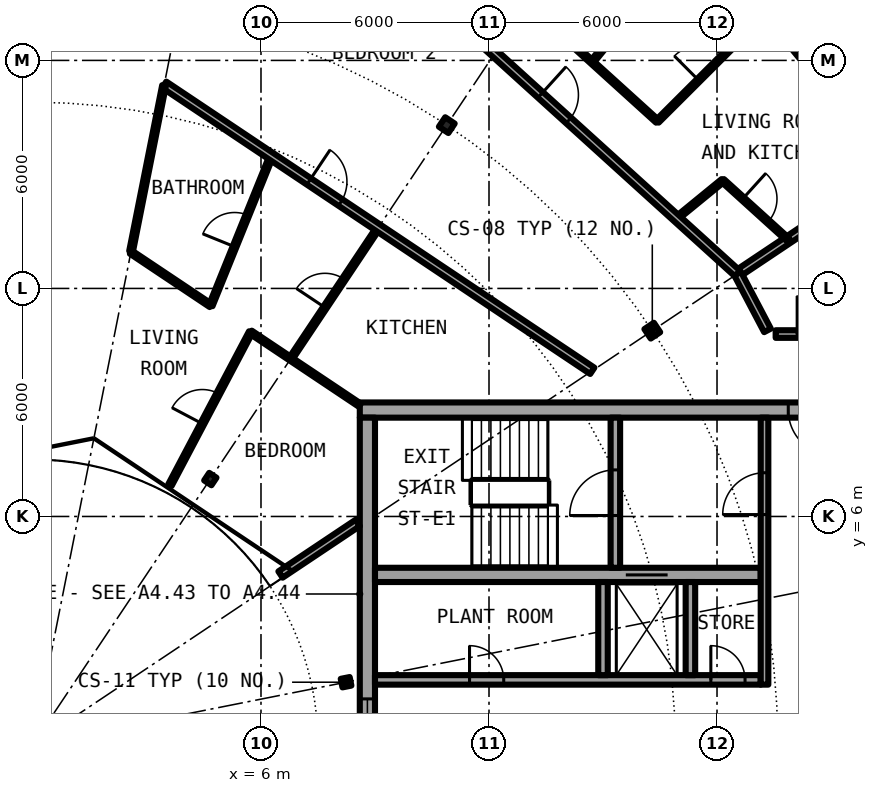
"""IFC4 building model, lengths in metres.
Left out: names, types, materials, properties, quantities, classifications, styles, units other than length and angle.
Written with IfcOpenShell. Run it as: python <this file> out.ifc"""

import sys

from ifc_helpers import new_model, si_unit, direction, frame, frame_2d, origin, origin_2d, place, context, subcontext, project, spatial, rectangle, i_section, extrude, element, fill, save


model = new_model("IFC4")
c1 = context("Model", 3, precision=1e-05, world=origin(), true_north=direction((0.0, 1.0)))
c2 = subcontext(c1, "Body", "Model", "MODEL_VIEW")
j1 = project(units=[si_unit("LENGTHUNIT", "METRE"), si_unit("PLANEANGLEUNIT", "RADIAN")], contexts=[c1])
p1 = place(None, origin())
s1 = spatial("IfcSite", under=j1, at=p1, CompositionType="ELEMENT")
p2 = place(p1, origin())
s2 = spatial("IfcBuilding", under=s1, at=p2, CompositionType="ELEMENT")
p3 = place(p2, frame((0.0, 0.0, 227.95)))
s3 = spatial("IfcBuildingStorey", under=s2, at=p3, CompositionType="ELEMENT", Elevation=227.95)
for number, where, z_axis, x_axis in (
    (1, (16.297, 10.889, 0.0), (0.0, 0.0, 1.0), (0.831, 0.556, 0.0)),
    (2, (10.889, 16.297, 0.0), (0.0, 0.0, 1.0), (0.556, 0.831, 0.0)),
):
    element("IfcColumn", number, at=place(p3, frame(where, z_axis=z_axis, x_axis=x_axis)), inside=s3, PredefinedType="COLUMN", context=c2, shape_type="SweptSolid", body=[
        extrude(i_section(OverallWidth=0.3, OverallDepth=0.3, WebThickness=0.011, FlangeThickness=0.019, FilletRadius=0.027, at=origin_2d()), origin(), (0.0, 0.0, 1.0), 3.05),
    ])
for number, where, z_axis, x_axis in (
    (3, (8.239, 1.639, 0.0), (0.0, 0.0, 1.0), (0.981, 0.195, 0.0)),
    (4, (4.667, 6.984, 0.0), (0.0, 0.0, 1.0), (0.556, 0.831, 0.0)),
):
    element("IfcColumn", number, at=place(p3, frame(where, z_axis=z_axis, x_axis=x_axis)), inside=s3, PredefinedType="COLUMN", context=c2, shape_type="SweptSolid", body=[
        extrude(i_section(OverallWidth=0.24, OverallDepth=0.23, WebThickness=0.008, FlangeThickness=0.012, FilletRadius=0.021, at=origin_2d()), origin(), (0.0, 0.0, 1.0), 3.05),
    ])
p4 = place(p3, frame((22.699, 15.167, 0.0), z_axis=(0.0, 0.0, 1.0), x_axis=(-0.634382322723, 0.773019449054, 0.0)))
e5 = element("IfcWall", 5, at=p4, inside=s3, PredefinedType="SOLIDWALL", context=c2, shape_type="SweptSolid", body=[
    extrude(rectangle(XDim=5.352, YDim=0.25, at=frame_2d((2.676, 0.0))), origin(), (0.0, 0.0, 1.0), 2.7),
])
p5 = place(p4, frame((0.841, 0.0, 0.0)))
e6 = element("IfcOpeningElement", 6, at=p5, cuts=e5, PredefinedType="OPENING", context=c2, shape_type="SweptSolid", body=[
    extrude(rectangle(XDim=1.0, YDim=2.2, at=frame_2d((0.5, 1.1))), frame((0.0, 0.135, 0.0), z_axis=(0.0, -1.0, 0.0), x_axis=(1.0, 0.0, 0.0)), (0.0, 0.0, 1.0), 0.27),
])
p6 = place(p4, frame((3.111, 0.0, 0.3)))
e7 = element("IfcOpeningElement", 7, at=p6, cuts=e5, PredefinedType="OPENING", context=c2, shape_type="SweptSolid", body=[
    extrude(rectangle(XDim=1.8, YDim=2.1, at=frame_2d((0.9, 1.05))), frame((0.0, 0.135, 0.0), z_axis=(0.0, -1.0, 0.0), x_axis=(1.0, 0.0, 0.0)), (0.0, 0.0, 1.0), 0.27),
])
p7 = place(p3, frame((22.0, 8.8, 0.0), z_axis=(0.0, 0.0, 1.0), x_axis=(-1.0, 0.0, 0.0)))
e8 = element("IfcWall", 8, at=p7, inside=s3, PredefinedType="SHEAR", context=c2, shape_type="SweptSolid", body=[
    extrude(rectangle(XDim=13.4, YDim=0.4, at=frame_2d((6.7, 0.0))), origin(), (0.0, 0.0, 1.0), 3.05),
])
p8 = place(p7, frame((0.925, 0.0, 0.0)))
e9 = element("IfcOpeningElement", 9, at=p8, cuts=e8, PredefinedType="OPENING", context=c2, shape_type="SweptSolid", body=[
    extrude(rectangle(XDim=1.2, YDim=2.3, at=frame_2d((0.6, 1.15))), frame((0.0, 0.21, 0.0), z_axis=(0.0, -1.0, 0.0), x_axis=(1.0, 0.0, 0.0)), (0.0, 0.0, 1.0), 0.42),
])
p9 = place(p3, frame((8.8, -8.6, 0.0), z_axis=(0.0, 0.0, 1.0), x_axis=(0.0, 1.0, 0.0)))
e10 = element("IfcWall", 10, at=p9, inside=s3, PredefinedType="SHEAR", context=c2, shape_type="SweptSolid", body=[
    extrude(rectangle(XDim=17.2, YDim=0.4, at=frame_2d((8.6, 0.0))), origin(), (0.0, 0.0, 1.0), 3.05),
])
p10 = place(p9, frame((7.4, 0.0, 0.1)))
e11 = element("IfcOpeningElement", 11, at=p10, cuts=e10, PredefinedType="OPENING", context=c2, shape_type="SweptSolid", body=[
    extrude(rectangle(XDim=2.4, YDim=2.2, at=frame_2d((1.2, 1.1))), frame((0.0, 0.21, 0.0), z_axis=(0.0, -1.0, 0.0), x_axis=(1.0, 0.0, 0.0)), (0.0, 0.0, 1.0), 0.42),
])
p11 = place(p3, frame((9.0, 1.7, 0.0), z_axis=(0.0, 0.0, 1.0), x_axis=(1.0, 0.0, 0.0)))
e12 = element("IfcWall", 12, at=p11, inside=s3, PredefinedType="SHEAR", context=c2, shape_type="SweptSolid", body=[
    extrude(rectangle(XDim=10.15, YDim=0.25, at=frame_2d((5.075, 0.0))), origin(), (0.0, 0.0, 1.0), 3.05),
])
p12 = place(p11, frame((2.488, 0.0, 0.0)))
e13 = element("IfcOpeningElement", 13, at=p12, cuts=e12, PredefinedType="OPENING", context=c2, shape_type="SweptSolid", body=[
    extrude(rectangle(XDim=0.9, YDim=2.3, at=frame_2d((0.45, 1.15))), frame((0.0, 0.135, 0.0), z_axis=(0.0, -1.0, 0.0), x_axis=(1.0, 0.0, 0.0)), (0.0, 0.0, 1.0), 0.27),
])
p13 = place(p11, frame((8.837, 0.0, 0.0)))
e14 = element("IfcOpeningElement", 14, at=p13, cuts=e12, PredefinedType="OPENING", context=c2, shape_type="SweptSolid", body=[
    extrude(rectangle(XDim=0.9, YDim=2.3, at=frame_2d((0.45, 1.15))), frame((0.0, 0.135, 0.0), z_axis=(0.0, -1.0, 0.0), x_axis=(1.0, 0.0, 0.0)), (0.0, 0.0, 1.0), 0.27),
])
p14 = place(p3, frame((9.0, 4.462, 0.0), z_axis=(0.0, 0.0, 1.0), x_axis=(1.0, 0.0, 0.0)))
e15 = element("IfcWall", 15, at=p14, inside=s3, PredefinedType="SHEAR", context=c2, shape_type="SweptSolid", body=[
    extrude(rectangle(XDim=10.15, YDim=0.375, at=frame_2d((5.075, 0.0))), origin(), (0.0, 0.0, 1.0), 3.05),
])
p15 = place(p14, frame((6.6, 0.0, 0.0)))
e16 = element("IfcOpeningElement", 16, at=p15, cuts=e15, PredefinedType="OPENING", context=c2, shape_type="SweptSolid", body=[
    extrude(rectangle(XDim=1.1, YDim=2.3, at=frame_2d((0.55, 1.15))), frame((0.0, 0.198, 0.0), z_axis=(0.0, -1.0, 0.0), x_axis=(1.0, 0.0, 0.0)), (0.0, 0.0, 1.0), 0.395),
])
p16 = place(p3, frame((15.325, 4.65, 0.0), z_axis=(0.0, 0.0, 1.0), x_axis=(0.0, 1.0, 0.0)))
e17 = element("IfcWall", 17, at=p16, inside=s3, PredefinedType="SHEAR", context=c2, shape_type="SweptSolid", body=[
    extrude(rectangle(XDim=3.95, YDim=0.25, at=frame_2d((1.975, 0.0))), origin(), (0.0, 0.0, 1.0), 3.05),
])
p17 = place(p16, frame((1.375, 0.0, 0.0)))
e18 = element("IfcOpeningElement", 18, at=p17, cuts=e17, PredefinedType="OPENING", context=c2, shape_type="SweptSolid", body=[
    extrude(rectangle(XDim=1.2, YDim=2.3, at=frame_2d((0.6, 1.15))), frame((0.0, 0.135, 0.0), z_axis=(0.0, -1.0, 0.0), x_axis=(1.0, 0.0, 0.0)), (0.0, 0.0, 1.0), 0.27),
])
for number, where, z_axis, x_axis in (
    (19, (15.0, 1.825, 0.0), (0.0, 0.0, 1.0), (0.0, 1.0, 0.0)),
    (20, (17.3, 1.825, 0.0), (0.0, 0.0, 1.0), (0.0, 1.0, 0.0)),
):
    element("IfcWall", number, at=place(p3, frame(where, z_axis=z_axis, x_axis=x_axis)), inside=s3, PredefinedType="SOLIDWALL", context=c2, shape_type="SweptSolid", body=[
        extrude(rectangle(XDim=2.45, YDim=0.25, at=frame_2d((1.225, 0.0))), origin(), (0.0, 0.0, 1.0), 2.7),
    ])
p18 = place(p3, frame((19.25, 1.575, 0.0), z_axis=(0.0, 0.0, 1.0), x_axis=(0.0, 1.0, 0.0)))
e21 = element("IfcWall", 21, at=p18, inside=s3, PredefinedType="SOLIDWALL", context=c2, shape_type="SweptSolid", body=[
    extrude(rectangle(XDim=7.025, YDim=0.2, at=frame_2d((3.513, 0.0))), origin(), (0.0, 0.0, 1.0), 2.7),
])
p19 = place(p18, frame((4.475, 0.0, 0.0)))
e22 = element("IfcOpeningElement", 22, at=p19, cuts=e21, PredefinedType="OPENING", context=c2, shape_type="SweptSolid", body=[
    extrude(rectangle(XDim=1.1, YDim=2.3, at=frame_2d((0.55, 1.15))), frame((0.0, 0.11, 0.0), z_axis=(0.0, -1.0, 0.0), x_axis=(1.0, 0.0, 0.0)), (0.0, 0.0, 1.0), 0.22),
])
p20 = place(p3, frame((3.605, 6.827, 0.0), z_axis=(0.0, 0.0, 1.0), x_axis=(0.466962677975, 0.884277025246, 0.0)))
e23 = element("IfcWall", 23, at=p20, inside=s3, PredefinedType="PARTITIONING", context=c2, shape_type="SweptSolid", body=[
    extrude(rectangle(XDim=4.549, YDim=0.1, at=frame_2d((2.274, 0.0))), origin(), (0.0, 0.0, 1.0), 2.7),
])
p21 = place(p20, frame((1.824, 0.0, 0.0)))
e24 = element("IfcOpeningElement", 24, at=p21, cuts=e23, PredefinedType="OPENING", context=c2, shape_type="SweptSolid", body=[
    extrude(rectangle(XDim=0.9, YDim=2.3, at=frame_2d((0.45, 1.15))), frame((0.0, 0.06, 0.0), z_axis=(0.0, -1.0, 0.0), x_axis=(1.0, 0.0, 0.0)), (0.0, 0.0, 1.0), 0.12),
])
p22 = place(p3, frame((4.678, 11.551, 0.0), z_axis=(0.0, 0.0, 1.0), x_axis=(0.375509828455, 0.926818411952, 0.0)))
e25 = element("IfcWall", 25, at=p22, inside=s3, PredefinedType="PARTITIONING", context=c2, shape_type="SweptSolid", body=[
    extrude(rectangle(XDim=4.237, YDim=0.1, at=frame_2d((2.119, 0.0))), origin(), (0.0, 0.0, 1.0), 2.7),
])
p23 = place(p22, frame((1.669, 0.0, 0.0)))
e26 = element("IfcOpeningElement", 26, at=p23, cuts=e25, PredefinedType="OPENING", context=c2, shape_type="SweptSolid", body=[
    extrude(rectangle(XDim=0.9, YDim=2.3, at=frame_2d((0.45, 1.15))), frame((0.0, 0.06, 0.0), z_axis=(0.0, -1.0, 0.0), x_axis=(1.0, 0.0, 0.0)), (0.0, 0.0, 1.0), 0.12),
])
p24 = place(p3, frame((6.78, 10.147, 0.0), z_axis=(0.0, 0.0, 1.0), x_axis=(0.555528237031, 0.831497671591, 0.0)))
e27 = element("IfcWall", 27, at=p24, inside=s3, PredefinedType="PARTITIONING", context=c2, shape_type="SweptSolid", body=[
    extrude(rectangle(XDim=4.149, YDim=0.1, at=frame_2d((2.075, 0.0))), origin(), (0.0, 0.0, 1.0), 2.7),
])
p25 = place(p24, frame((1.625, 0.0, 0.0)))
e28 = element("IfcOpeningElement", 28, at=p25, cuts=e27, PredefinedType="OPENING", context=c2, shape_type="SweptSolid", body=[
    extrude(rectangle(XDim=0.9, YDim=2.3, at=frame_2d((0.45, 1.15))), frame((0.0, 0.06, 0.0), z_axis=(0.0, -1.0, 0.0), x_axis=(1.0, 0.0, 0.0)), (0.0, 0.0, 1.0), 0.12),
])
p26 = place(p3, frame((14.709, 17.958, 0.0), z_axis=(0.0, 0.0, 1.0), x_axis=(0.633590098448, 0.773668913133, 0.0)))
e29 = element("IfcWall", 29, at=p26, inside=s3, PredefinedType="PARTITIONING", context=c2, shape_type="SweptSolid", body=[
    extrude(rectangle(XDim=3.962, YDim=0.1, at=frame_2d((1.981, 0.0))), origin(), (0.0, 0.0, 1.0), 2.7),
])
p27 = place(p3, frame((16.43, 16.398, 0.0), z_axis=(0.0, 0.0, 1.0), x_axis=(0.707722727509, 0.706490297858, 0.0)))
e30 = element("IfcWall", 30, at=p27, inside=s3, PredefinedType="PARTITIONING", context=c2, shape_type="SweptSolid", body=[
    extrude(rectangle(XDim=3.962, YDim=0.1, at=frame_2d((1.981, 0.0))), origin(), (0.0, 0.0, 1.0), 2.7),
])
p28 = place(p27, frame((1.531, 0.0, 0.0)))
e31 = element("IfcOpeningElement", 31, at=p28, cuts=e30, PredefinedType="OPENING", context=c2, shape_type="SweptSolid", body=[
    extrude(rectangle(XDim=0.9, YDim=2.3, at=frame_2d((0.45, 1.15))), frame((0.0, 0.06, 0.0), z_axis=(0.0, -1.0, 0.0), x_axis=(1.0, 0.0, 0.0)), (0.0, 0.0, 1.0), 0.12),
])
p29 = place(p3, frame((16.936, 13.845, 0.0), z_axis=(0.0, 0.0, 1.0), x_axis=(0.774283039722, 0.632839453889, 0.0)))
e32 = element("IfcWall", 32, at=p29, inside=s3, PredefinedType="PARTITIONING", context=c2, shape_type="SweptSolid", body=[
    extrude(rectangle(XDim=1.569, YDim=0.1, at=frame_2d((0.785, 0.0))), origin(), (0.0, 0.0, 1.0), 2.7),
])
p30 = place(p3, frame((18.542, 12.389, 0.0), z_axis=(0.0, 0.0, 1.0), x_axis=(0.831387096605, 0.55569370664, 0.0)))
e33 = element("IfcWall", 33, at=p30, inside=s3, PredefinedType="PARTITIONING", context=c2, shape_type="SweptSolid", body=[
    extrude(rectangle(XDim=4.875, YDim=0.2, at=frame_2d((2.438, 0.0))), origin(), (0.0, 0.0, 1.0), 2.7),
])
p31 = place(p3, frame((6.513, 4.472, 0.0), z_axis=(0.0, 0.0, 1.0), x_axis=(0.831450132577, 0.555599385382, 0.0)))
e34 = element("IfcWall", 34, at=p31, inside=s3, PredefinedType="PARTITIONING", context=c2, shape_type="SweptSolid", body=[
    extrude(rectangle(XDim=2.443, YDim=0.2, at=frame_2d((1.221, 0.0))), origin(), (0.0, 0.0, 1.0), 2.7),
])
p32 = place(p3, frame((19.543, 10.8, 0.0), z_axis=(0.0, 0.0, 1.0), x_axis=(1.0, 0.0, 0.0)))
e35 = element("IfcWall", 35, at=p32, inside=s3, PredefinedType="PARTITIONING", context=c2, shape_type="SweptSolid", body=[
    extrude(rectangle(XDim=2.132, YDim=0.2, at=frame_2d((1.066, 0.0))), origin(), (0.0, 0.0, 1.0), 2.7),
])
p33 = place(p32, frame((0.566, 0.0, 0.0)))
e36 = element("IfcOpeningElement", 36, at=p33, cuts=e35, PredefinedType="OPENING", context=c2, shape_type="SweptSolid", body=[
    extrude(rectangle(XDim=1.0, YDim=2.3, at=frame_2d((0.5, 1.15))), frame((0.0, 0.11, 0.0), z_axis=(0.0, -1.0, 0.0), x_axis=(1.0, 0.0, 0.0)), (0.0, 0.0, 1.0), 0.22),
])
p34 = place(p3, frame((2.577, 12.955, 0.0), z_axis=(0.0, 0.0, 1.0), x_axis=(0.831440395268, -0.555613956912, 0.0)))
e37 = element("IfcWall", 37, at=p34, inside=s3, PredefinedType="PARTITIONING", context=c2, shape_type="SweptSolid", body=[
    extrude(rectangle(XDim=2.527, YDim=0.1, at=frame_2d((1.264, 0.0))), origin(), (0.0, 0.0, 1.0), 2.7),
])
p35 = place(p3, frame((5.73, 10.848, 0.0), z_axis=(0.0, 0.0, 1.0), x_axis=(0.831397130511, -0.555678694372, 0.0)))
e38 = element("IfcWall", 38, at=p35, inside=s3, PredefinedType="PARTITIONING", context=c2, shape_type="SweptSolid", body=[
    extrude(rectangle(XDim=3.453, YDim=0.1, at=frame_2d((1.727, 0.0))), origin(), (0.0, 0.0, 1.0), 2.7),
])
p36 = place(p3, frame((3.453, 17.36, 0.0), z_axis=(0.0, 0.0, 1.0), x_axis=(0.831437137577, -0.555618831806, 0.0)))
e39 = element("IfcWall", 39, at=p36, inside=s3, PredefinedType="PARTITIONING", context=c2, shape_type="SweptSolid", body=[
    extrude(rectangle(XDim=13.549, YDim=0.2, at=frame_2d((6.774, 0.0))), origin(), (0.0, 0.0, 1.0), 2.7),
])
p37 = place(p36, frame((4.581, 0.0, 0.0)))
e40 = element("IfcOpeningElement", 40, at=p37, cuts=e39, PredefinedType="OPENING", context=c2, shape_type="SweptSolid", body=[
    extrude(rectangle(XDim=1.0, YDim=2.3, at=frame_2d((0.5, 1.15))), frame((0.0, 0.11, 0.0), z_axis=(0.0, -1.0, 0.0), x_axis=(1.0, 0.0, 0.0)), (0.0, 0.0, 1.0), 0.22),
])
p38 = place(p3, frame((10.512, 19.667, 0.0), z_axis=(0.0, 0.0, 1.0), x_axis=(0.740947367223, -0.671563101283, 0.0)))
e41 = element("IfcWall", 41, at=p38, inside=s3, PredefinedType="PARTITIONING", context=c2, shape_type="SweptSolid", body=[
    extrude(rectangle(XDim=10.837, YDim=0.2, at=frame_2d((5.419, 0.0))), origin(), (0.0, 0.0, 1.0), 2.7),
])
p39 = place(p38, frame((3.835, 0.0, 0.0)))
e42 = element("IfcOpeningElement", 42, at=p39, cuts=e41, PredefinedType="OPENING", context=c2, shape_type="SweptSolid", body=[
    extrude(rectangle(XDim=1.0, YDim=2.3, at=frame_2d((0.5, 1.15))), frame((0.0, 0.11, 0.0), z_axis=(0.0, -1.0, 0.0), x_axis=(1.0, 0.0, 0.0)), (0.0, 0.0, 1.0), 0.22),
])
p40 = place(p3, frame((18.542, 12.389, 0.0), z_axis=(0.0, 0.0, 1.0), x_axis=(0.465812036273, -0.88488369115, 0.0)))
e43 = element("IfcWall", 43, at=p40, inside=s3, PredefinedType="PARTITIONING", context=c2, shape_type="SweptSolid", body=[
    extrude(rectangle(XDim=1.687, YDim=0.2, at=frame_2d((0.844, 0.0))), origin(), (0.0, 0.0, 1.0), 2.7),
])
p41 = place(p3, frame((11.266, 21.078, 0.0), z_axis=(0.0, 0.0, 1.0), x_axis=(0.74097115376, -0.671536856245, 0.0)))
e44 = element("IfcWall", 44, at=p41, inside=s3, PredefinedType="PARTITIONING", context=c2, shape_type="SweptSolid", body=[
    extrude(rectangle(XDim=6.969, YDim=0.1, at=frame_2d((3.484, 0.0))), origin(), (0.0, 0.0, 1.0), 2.7),
])
p42 = place(p41, frame((3.034, 0.0, 0.0)))
e45 = element("IfcOpeningElement", 45, at=p42, cuts=e44, PredefinedType="OPENING", context=c2, shape_type="SweptSolid", body=[
    extrude(rectangle(XDim=0.9, YDim=2.3, at=frame_2d((0.45, 1.15))), frame((0.0, 0.06, 0.0), z_axis=(0.0, -1.0, 0.0), x_axis=(1.0, 0.0, 0.0)), (0.0, 0.0, 1.0), 0.12),
])
p43 = place(p41, frame((0.712, 0.0, 0.0)))
e46 = element("IfcOpeningElement", 46, at=p43, cuts=e44, PredefinedType="OPENING", context=c2, shape_type="SweptSolid", body=[
    extrude(rectangle(XDim=0.9, YDim=2.3, at=frame_2d((0.45, 1.15))), frame((0.0, 0.06, 0.0), z_axis=(0.0, -1.0, 0.0), x_axis=(1.0, 0.0, 0.0)), (0.0, 0.0, 1.0), 0.12),
])
p44 = place(p3, frame((18.149, 14.84, 0.0), z_axis=(0.0, 0.0, 1.0), x_axis=(0.741127434804, -0.671364376014, 0.0)))
e47 = element("IfcWall", 47, at=p44, inside=s3, PredefinedType="PARTITIONING", context=c2, shape_type="SweptSolid", body=[
    extrude(rectangle(XDim=2.324, YDim=0.1, at=frame_2d((1.162, 0.0))), origin(), (0.0, 0.0, 1.0), 2.7),
])
p45 = place(p44, frame((0.714, 0.0, 0.0)))
e48 = element("IfcOpeningElement", 48, at=p45, cuts=e47, PredefinedType="OPENING", context=c2, shape_type="SweptSolid", body=[
    extrude(rectangle(XDim=0.9, YDim=2.3, at=frame_2d((0.45, 1.15))), frame((0.0, 0.06, 0.0), z_axis=(0.0, -1.0, 0.0), x_axis=(1.0, 0.0, 0.0)), (0.0, 0.0, 1.0), 0.12),
])
p46 = place(p3, frame((2.581, 12.976, 0.0), z_axis=(0.0, 0.0, 1.0), x_axis=(0.195102838171, 0.980782790702, 0.0)))
e49 = element("IfcWall", 49, at=p46, inside=s3, PredefinedType="PARTITIONING", context=c2, shape_type="SweptSolid", body=[
    extrude(rectangle(XDim=4.448, YDim=0.1, at=frame_2d((2.224, 0.0))), origin(), (0.0, 0.0, 1.0), 2.7),
])
p47 = place(p6, origin())
e50 = element("IfcWindow", 50, at=p47, inside=s3, PartitioningType="SINGLE_PANEL", PredefinedType="WINDOW", context=c2, shape_type="SweptSolid", body=[
    extrude(rectangle(XDim=1.8, YDim=2.1, at=frame_2d((0.9, 1.05))), frame((0.0, 0.03, 0.0), z_axis=(0.0, -1.0, 0.0), x_axis=(1.0, 0.0, 0.0)), (0.0, 0.0, 1.0), 0.06),
])
fill(e7, e50)
p48 = place(p15, origin())
e51 = element("IfcDoor", 51, at=p48, inside=s3, OperationType="DOUBLE_DOOR_SLIDING", PredefinedType="DOOR", context=c2, shape_type="SweptSolid", body=[
    extrude(rectangle(XDim=1.1, YDim=2.3, at=frame_2d((0.55, 1.15))), frame((0.0, 0.025, 0.0), z_axis=(0.0, -1.0, 0.0), x_axis=(1.0, 0.0, 0.0)), (0.0, 0.0, 1.0), 0.05),
])
fill(e16, e51)
p49 = place(p12, origin())
e52 = element("IfcDoor", 52, at=p49, inside=s3, OperationType="SINGLE_SWING_RIGHT", PredefinedType="DOOR", context=c2, shape_type="SweptSolid", body=[
    extrude(rectangle(XDim=0.9, YDim=2.3, at=frame_2d((0.45, 1.15))), frame((0.0, 0.025, 0.0), z_axis=(0.0, -1.0, 0.0), x_axis=(1.0, 0.0, 0.0)), (0.0, 0.0, 1.0), 0.05),
])
fill(e13, e52)
p50 = place(p13, origin())
e53 = element("IfcDoor", 53, at=p50, inside=s3, OperationType="SINGLE_SWING_LEFT", PredefinedType="DOOR", context=c2, shape_type="SweptSolid", body=[
    extrude(rectangle(XDim=0.9, YDim=2.3, at=frame_2d((0.45, 1.15))), frame((0.0, 0.025, 0.0), z_axis=(0.0, -1.0, 0.0), x_axis=(1.0, 0.0, 0.0)), (0.0, 0.0, 1.0), 0.05),
])
fill(e14, e53)
p51 = place(p17, origin())
e54 = element("IfcDoor", 54, at=p51, inside=s3, OperationType="SINGLE_SWING_LEFT", PredefinedType="DOOR", context=c2, shape_type="SweptSolid", body=[
    extrude(rectangle(XDim=1.2, YDim=2.3, at=frame_2d((0.6, 1.15))), frame((0.0, 0.025, 0.0), z_axis=(0.0, -1.0, 0.0), x_axis=(1.0, 0.0, 0.0)), (0.0, 0.0, 1.0), 0.05),
])
fill(e18, e54)
p52 = place(p19, origin())
e55 = element("IfcDoor", 55, at=p52, inside=s3, OperationType="SINGLE_SWING_LEFT", PredefinedType="DOOR", context=c2, shape_type="SweptSolid", body=[
    extrude(rectangle(XDim=1.1, YDim=2.3, at=frame_2d((0.55, 1.15))), frame((0.0, 0.025, 0.0), z_axis=(0.0, -1.0, 0.0), x_axis=(1.0, 0.0, 0.0)), (0.0, 0.0, 1.0), 0.05),
])
fill(e22, e55)
p53 = place(p8, origin())
e56 = element("IfcDoor", 56, at=p53, inside=s3, OperationType="SINGLE_SWING_RIGHT", PredefinedType="DOOR", context=c2, shape_type="SweptSolid", body=[
    extrude(rectangle(XDim=1.2, YDim=2.3, at=frame_2d((0.6, 1.15))), frame((0.0, 0.025, 0.0), z_axis=(0.0, -1.0, 0.0), x_axis=(1.0, 0.0, 0.0)), (0.0, 0.0, 1.0), 0.05),
])
fill(e9, e56)
p54 = place(p10, origin())
e57 = element("IfcWindow", 57, at=p54, inside=s3, PartitioningType="SINGLE_PANEL", PredefinedType="WINDOW", context=c2, shape_type="SweptSolid", body=[
    extrude(rectangle(XDim=2.4, YDim=2.2, at=frame_2d((1.2, 1.1))), frame((0.0, 0.03, 0.0), z_axis=(0.0, -1.0, 0.0), x_axis=(1.0, 0.0, 0.0)), (0.0, 0.0, 1.0), 0.06),
])
fill(e11, e57)
p55 = place(p39, origin())
e58 = element("IfcDoor", 58, at=p55, inside=s3, OperationType="SINGLE_SWING_LEFT", PredefinedType="DOOR", context=c2, shape_type="SweptSolid", body=[
    extrude(rectangle(XDim=1.0, YDim=2.3, at=frame_2d((0.5, 1.15))), frame((0.0, 0.025, 0.0), z_axis=(0.0, -1.0, 0.0), x_axis=(1.0, 0.0, 0.0)), (0.0, 0.0, 1.0), 0.05),
])
fill(e42, e58)
p56 = place(p45, origin())
e59 = element("IfcDoor", 59, at=p56, inside=s3, OperationType="SINGLE_SWING_RIGHT", PredefinedType="DOOR", context=c2, shape_type="SweptSolid", body=[
    extrude(rectangle(XDim=0.9, YDim=2.3, at=frame_2d((0.45, 1.15))), frame((0.0, 0.025, 0.0), z_axis=(0.0, -1.0, 0.0), x_axis=(1.0, 0.0, 0.0)), (0.0, 0.0, 1.0), 0.05),
])
fill(e48, e59)
p57 = place(p28, origin())
e60 = element("IfcDoor", 60, at=p57, inside=s3, OperationType="SINGLE_SWING_RIGHT", PredefinedType="DOOR", context=c2, shape_type="SweptSolid", body=[
    extrude(rectangle(XDim=0.9, YDim=2.3, at=frame_2d((0.45, 1.15))), frame((0.0, 0.025, 0.0), z_axis=(0.0, -1.0, 0.0), x_axis=(1.0, 0.0, 0.0)), (0.0, 0.0, 1.0), 0.05),
])
fill(e31, e60)
p58 = place(p37, origin())
e61 = element("IfcDoor", 61, at=p58, inside=s3, OperationType="SINGLE_SWING_LEFT", PredefinedType="DOOR", context=c2, shape_type="SweptSolid", body=[
    extrude(rectangle(XDim=1.0, YDim=2.3, at=frame_2d((0.5, 1.15))), frame((0.0, 0.025, 0.0), z_axis=(0.0, -1.0, 0.0), x_axis=(1.0, 0.0, 0.0)), (0.0, 0.0, 1.0), 0.05),
])
fill(e40, e61)
p59 = place(p23, origin())
e62 = element("IfcDoor", 62, at=p59, inside=s3, OperationType="SINGLE_SWING_RIGHT", PredefinedType="DOOR", context=c2, shape_type="SweptSolid", body=[
    extrude(rectangle(XDim=0.9, YDim=2.3, at=frame_2d((0.45, 1.15))), frame((0.0, 0.025, 0.0), z_axis=(0.0, -1.0, 0.0), x_axis=(1.0, 0.0, 0.0)), (0.0, 0.0, 1.0), 0.05),
])
fill(e26, e62)
p60 = place(p25, origin())
e63 = element("IfcDoor", 63, at=p60, inside=s3, OperationType="SINGLE_SWING_RIGHT", PredefinedType="DOOR", context=c2, shape_type="SweptSolid", body=[
    extrude(rectangle(XDim=0.9, YDim=2.3, at=frame_2d((0.45, 1.15))), frame((0.0, 0.025, 0.0), z_axis=(0.0, -1.0, 0.0), x_axis=(1.0, 0.0, 0.0)), (0.0, 0.0, 1.0), 0.05),
])
fill(e28, e63)
p61 = place(p21, origin())
e64 = element("IfcDoor", 64, at=p61, inside=s3, OperationType="SINGLE_SWING_LEFT", PredefinedType="DOOR", context=c2, shape_type="SweptSolid", body=[
    extrude(rectangle(XDim=0.9, YDim=2.3, at=frame_2d((0.45, 1.15))), frame((0.0, 0.025, 0.0), z_axis=(0.0, -1.0, 0.0), x_axis=(1.0, 0.0, 0.0)), (0.0, 0.0, 1.0), 0.05),
])
fill(e24, e64)
p62 = place(p33, origin())
e65 = element("IfcDoor", 65, at=p62, inside=s3, OperationType="SINGLE_SWING_RIGHT", PredefinedType="DOOR", context=c2, shape_type="SweptSolid", body=[
    extrude(rectangle(XDim=1.0, YDim=2.3, at=frame_2d((0.5, 1.15))), frame((0.0, 0.025, 0.0), z_axis=(0.0, -1.0, 0.0), x_axis=(1.0, 0.0, 0.0)), (0.0, 0.0, 1.0), 0.05),
])
fill(e36, e65)
save(model, sys.argv[1])
